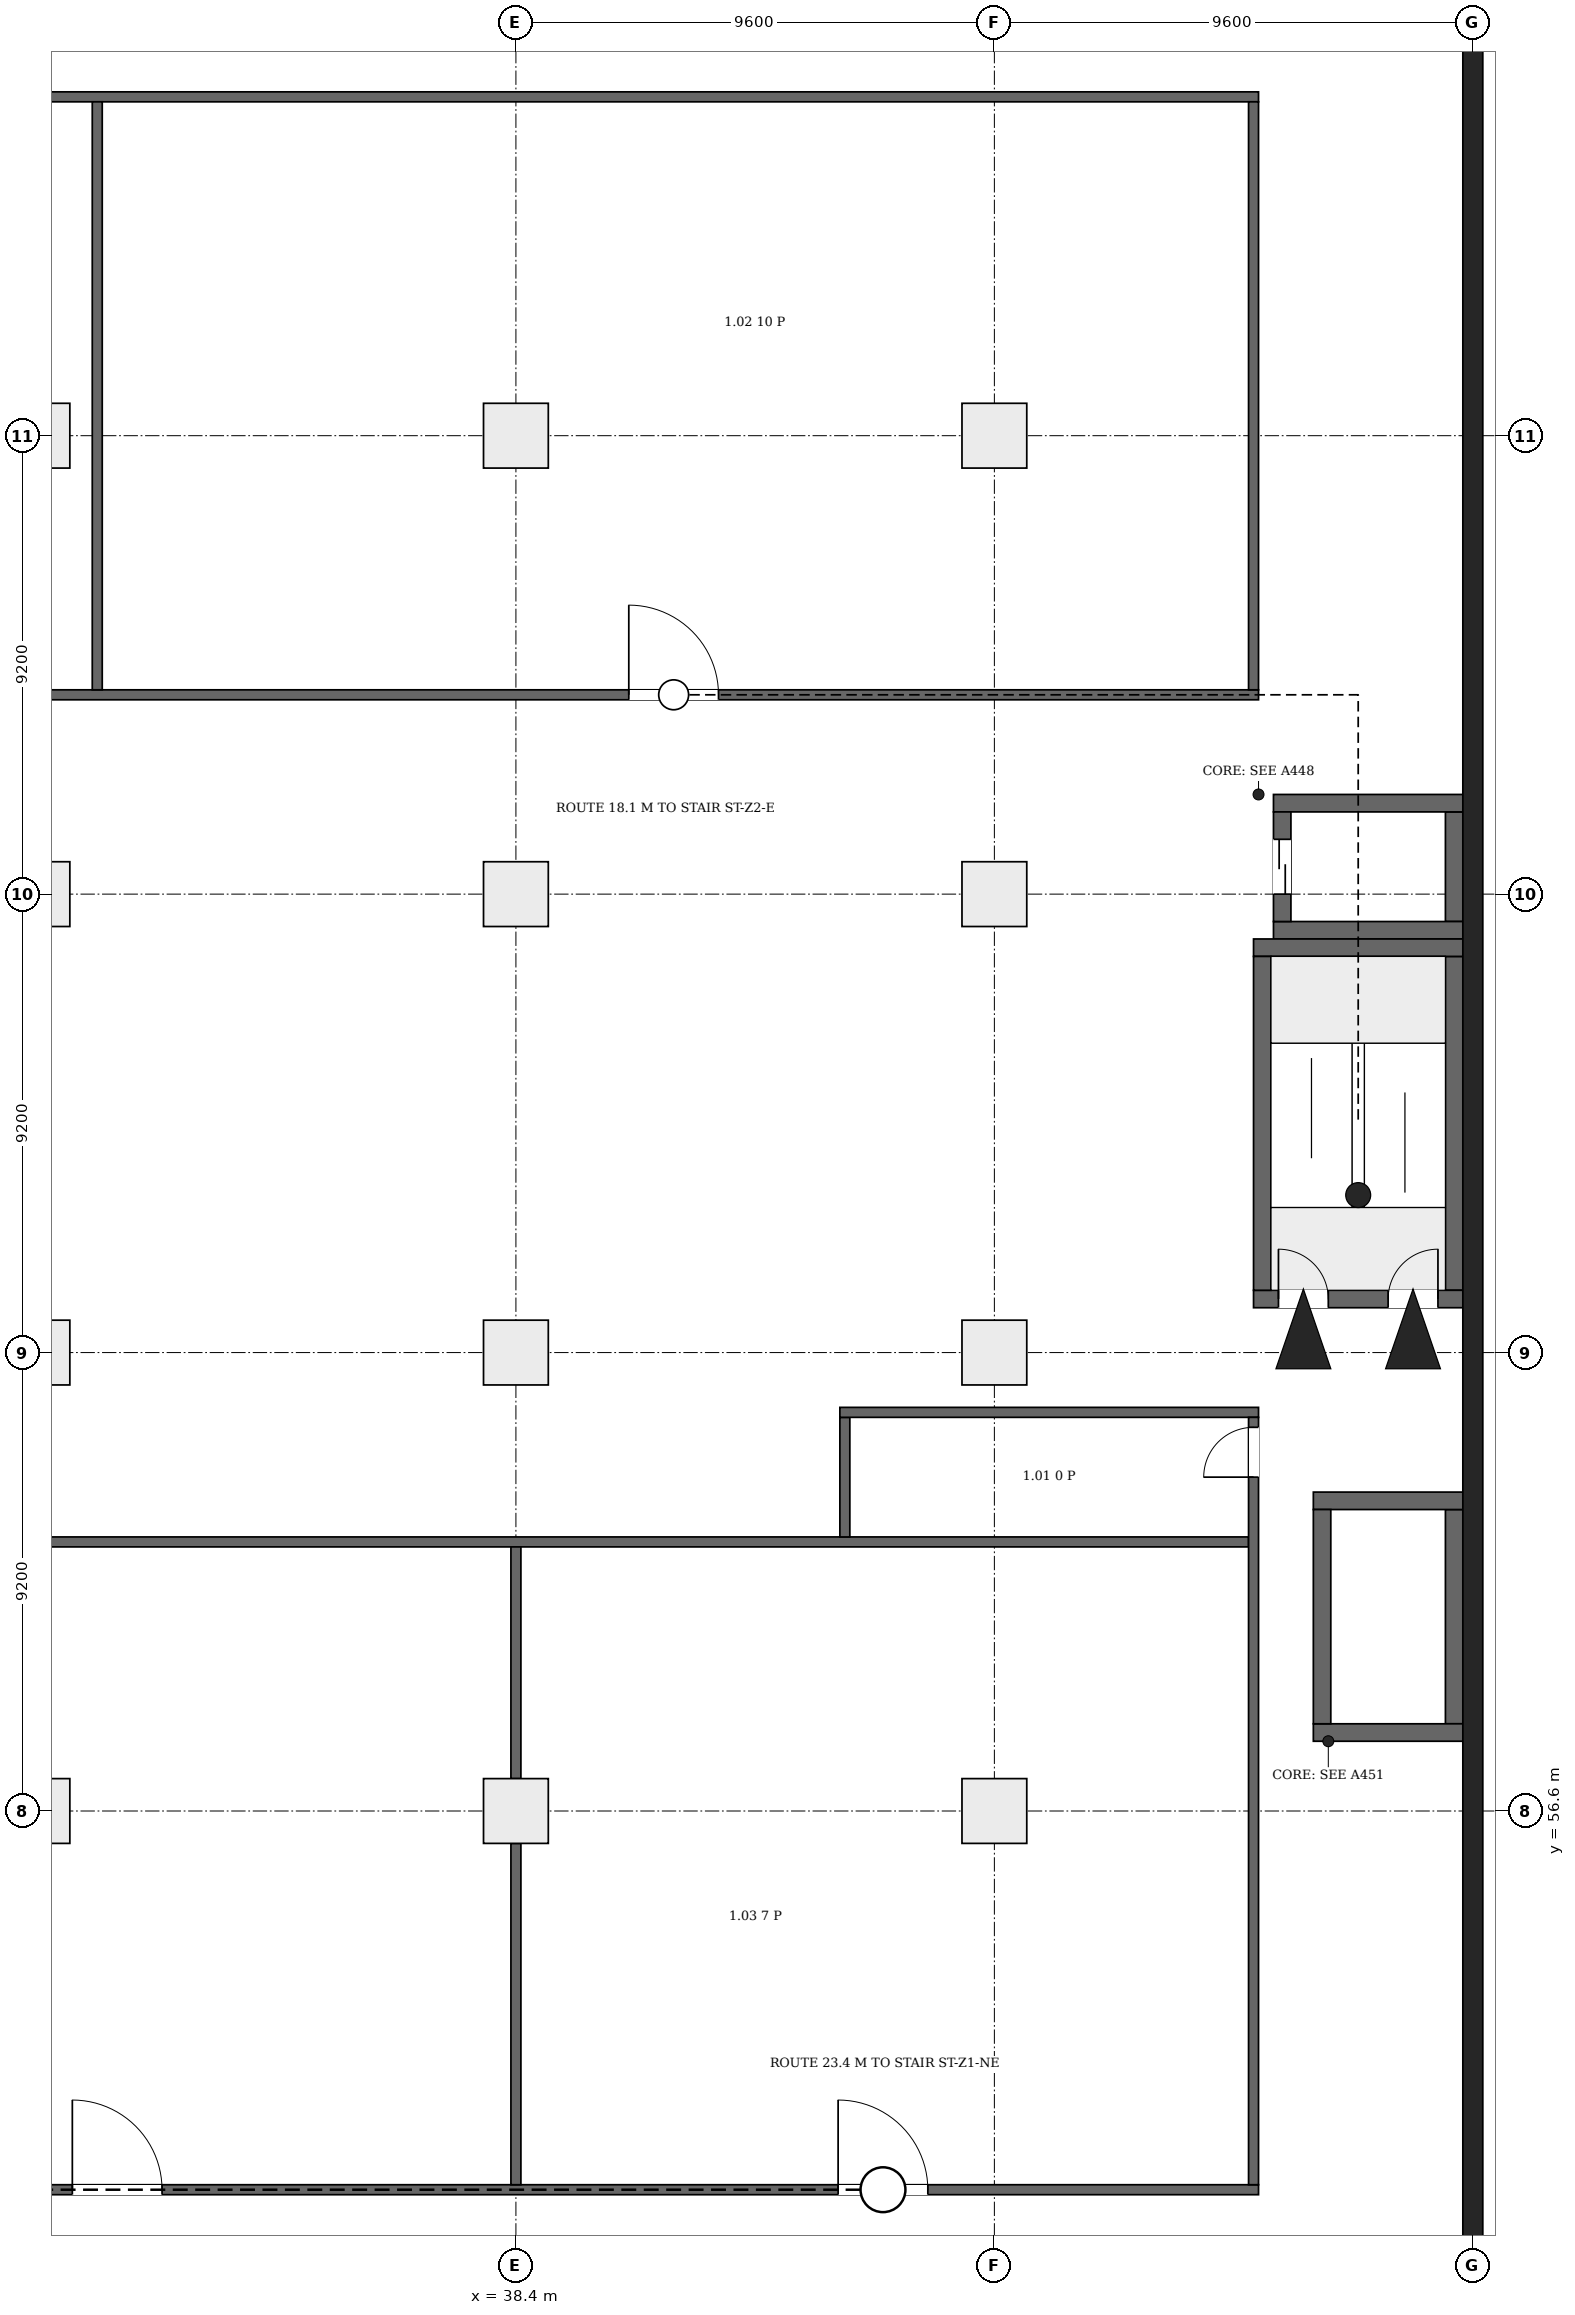
"""IFC4 building model, lengths in metres.
Left out: names, types, materials, properties, quantities, classifications, styles, units other than length and angle.
Written with IfcOpenShell. Run it as: python <this file> out.ifc"""

import sys

from ifc_helpers import new_model, si_unit, direction, frame, frame_2d, origin, origin_2d, place, context, subcontext, project, spatial, rectangle, extrude, element, fill, save


model = new_model("IFC4")
c1 = context("Model", 3, precision=1e-05, world=origin(), true_north=direction((0.0, 1.0)))
c2 = subcontext(c1, "Body", "Model", "MODEL_VIEW")
j1 = project(units=[si_unit("LENGTHUNIT", "METRE"), si_unit("PLANEANGLEUNIT", "RADIAN")], contexts=[c1])
p1 = place(None, origin())
s1 = spatial("IfcSite", under=j1, at=p1, CompositionType="ELEMENT")
p2 = place(p1, origin())
s2 = spatial("IfcBuilding", under=s1, at=p2, CompositionType="ELEMENT")
p3 = place(p2, frame((0.0, 0.0, 6.5)))
s3 = spatial("IfcBuildingStorey", under=s2, at=p3, CompositionType="ELEMENT", Elevation=6.5)
p4 = place(p3, frame((57.6, 46.72, 0.0), z_axis=(0.0, 0.0, 1.0), x_axis=(0.0, 1.0, 0.0)))
e1 = element("IfcWall", 1, at=p4, inside=s3, PredefinedType="SHEAR", context=c2, shape_type="SweptSolid", body=[
    extrude(rectangle(XDim=47.36, YDim=0.4, at=frame_2d((23.68, 0.0))), origin(), (0.0, 0.0, 1.0), 7.7),
])
p5 = place(p3, frame((53.2, 66.875, 0.0), z_axis=(0.0, 0.0, 1.0), x_axis=(1.0, 0.0, 0.0)))
e2 = element("IfcWall", 2, at=p5, inside=s3, PredefinedType="SHEAR", context=c2, shape_type="SweptSolid", body=[
    extrude(rectangle(XDim=4.2, YDim=0.35, at=frame_2d((2.1, 0.0))), origin(), (0.0, 0.0, 1.0), 7.7),
])
p6 = place(p5, frame((0.5, 0.0, 0.0)))
e3 = element("IfcOpeningElement", 3, at=p6, cuts=e2, PredefinedType="OPENING", context=c2, shape_type="SweptSolid", body=[
    extrude(rectangle(XDim=1.0, YDim=2.1, at=frame_2d((0.5, 1.05))), frame((0.0, 0.185, 0.0), z_axis=(0.0, -1.0, 0.0), x_axis=(1.0, 0.0, 0.0)), (0.0, 0.0, 1.0), 0.37),
])
p7 = place(p5, frame((2.7, 0.0, 0.0)))
e4 = element("IfcOpeningElement", 4, at=p7, cuts=e2, PredefinedType="OPENING", context=c2, shape_type="SweptSolid", body=[
    extrude(rectangle(XDim=1.0, YDim=2.1, at=frame_2d((0.5, 1.05))), frame((0.0, 0.185, 0.0), z_axis=(0.0, -1.0, 0.0), x_axis=(1.0, 0.0, 0.0)), (0.0, 0.0, 1.0), 0.37),
])
p8 = place(p3, frame((53.2, 73.925, 0.0), z_axis=(0.0, 0.0, 1.0), x_axis=(1.0, 0.0, 0.0)))
e5 = element("IfcWall", 5, at=p8, inside=s3, PredefinedType="SHEAR", context=c2, shape_type="SweptSolid", body=[
    extrude(rectangle(XDim=4.2, YDim=0.35, at=frame_2d((2.1, 0.0))), origin(), (0.0, 0.0, 1.0), 7.7),
])
for number, where, z_axis, x_axis in (
    (6, (53.375, 67.05, 0.0), (0.0, 0.0, 1.0), (0.0, 1.0, 0.0)),
    (7, (57.225, 67.05, 0.0), (0.0, 0.0, 1.0), (0.0, 1.0, 0.0)),
):
    element("IfcWall", number, at=place(p3, frame(where, z_axis=z_axis, x_axis=x_axis)), inside=s3, PredefinedType="SHEAR", context=c2, shape_type="SweptSolid", body=[
        extrude(rectangle(XDim=6.7, YDim=0.35, at=frame_2d((3.35, 0.0))), origin(), (0.0, 0.0, 1.0), 7.7),
    ])
for number, where, z_axis, x_axis in (
    (8, (53.6, 74.275, 0.0), (0.0, 0.0, 1.0), (1.0, 0.0, 0.0)),
    (9, (53.6, 76.825, 0.0), (0.0, 0.0, 1.0), (1.0, 0.0, 0.0)),
):
    element("IfcWall", number, at=place(p3, frame(where, z_axis=z_axis, x_axis=x_axis)), inside=s3, PredefinedType="SHEAR", context=c2, shape_type="SweptSolid", body=[
        extrude(rectangle(XDim=3.8, YDim=0.35, at=frame_2d((1.9, 0.0))), origin(), (0.0, 0.0, 1.0), 7.7),
    ])
p9 = place(p3, frame((53.775, 74.45, 0.0), z_axis=(0.0, 0.0, 1.0), x_axis=(0.0, 1.0, 0.0)))
e10 = element("IfcWall", 10, at=p9, inside=s3, PredefinedType="SHEAR", context=c2, shape_type="SweptSolid", body=[
    extrude(rectangle(XDim=2.2, YDim=0.35, at=frame_2d((1.1, 0.0))), origin(), (0.0, 0.0, 1.0), 7.7),
])
p10 = place(p9, frame((0.55, 0.0, 0.0)))
e11 = element("IfcOpeningElement", 11, at=p10, cuts=e10, PredefinedType="OPENING", context=c2, shape_type="SweptSolid", body=[
    extrude(rectangle(XDim=1.1, YDim=2.1, at=frame_2d((0.55, 1.05))), frame((0.0, 0.185, 0.0), z_axis=(0.0, -1.0, 0.0), x_axis=(1.0, 0.0, 0.0)), (0.0, 0.0, 1.0), 0.37),
])
p11 = place(p3, frame((57.225, 74.45, 0.0), z_axis=(0.0, 0.0, 1.0), x_axis=(0.0, 1.0, 0.0)))
e12 = element("IfcWall", 12, at=p11, inside=s3, PredefinedType="SHEAR", context=c2, shape_type="SweptSolid", body=[
    extrude(rectangle(XDim=2.2, YDim=0.35, at=frame_2d((1.1, 0.0))), origin(), (0.0, 0.0, 1.0), 7.7),
])
for number, where, z_axis, x_axis in (
    (13, (54.4, 58.175, 0.0), (0.0, 0.0, 1.0), (1.0, 0.0, 0.0)),
    (14, (54.4, 62.825, 0.0), (0.0, 0.0, 1.0), (1.0, 0.0, 0.0)),
):
    element("IfcWall", number, at=place(p3, frame(where, z_axis=z_axis, x_axis=x_axis)), inside=s3, PredefinedType="SHEAR", context=c2, shape_type="SweptSolid", body=[
        extrude(rectangle(XDim=3.0, YDim=0.35, at=frame_2d((1.5, 0.0))), origin(), (0.0, 0.0, 1.0), 7.7),
    ])
for number, where, z_axis, x_axis in (
    (15, (54.575, 58.35, 0.0), (0.0, 0.0, 1.0), (0.0, 1.0, 0.0)),
    (16, (57.225, 58.35, 0.0), (0.0, 0.0, 1.0), (0.0, 1.0, 0.0)),
):
    element("IfcWall", number, at=place(p3, frame(where, z_axis=z_axis, x_axis=x_axis)), inside=s3, PredefinedType="SHEAR", context=c2, shape_type="SweptSolid", body=[
        extrude(rectangle(XDim=4.3, YDim=0.35, at=frame_2d((2.15, 0.0))), origin(), (0.0, 0.0, 1.0), 7.7),
    ])
for number, where, z_axis, x_axis in (
    (17, (28.8, 56.6, 0.0), (0.0, 0.0, 1.0), (1.0, 0.0, 0.0)),
    (18, (38.4, 56.6, 0.0), (0.0, 0.0, 1.0), (1.0, 0.0, 0.0)),
    (19, (48.0, 56.6, 0.0), (0.0, 0.0, 1.0), (1.0, 0.0, 0.0)),
    (20, (28.8, 65.8, 0.0), (0.0, 0.0, 1.0), (1.0, 0.0, 0.0)),
    (21, (38.4, 65.8, 0.0), (0.0, 0.0, 1.0), (1.0, 0.0, 0.0)),
    (22, (48.0, 65.8, 0.0), (0.0, 0.0, 1.0), (1.0, 0.0, 0.0)),
    (23, (28.8, 75.0, 0.0), (0.0, 0.0, 1.0), (1.0, 0.0, 0.0)),
    (24, (38.4, 75.0, 0.0), (0.0, 0.0, 1.0), (1.0, 0.0, 0.0)),
    (25, (48.0, 75.0, 0.0), (0.0, 0.0, 1.0), (1.0, 0.0, 0.0)),
    (26, (28.8, 84.2, 0.0), (0.0, 0.0, 1.0), (1.0, 0.0, 0.0)),
    (27, (38.4, 84.2, 0.0), (0.0, 0.0, 1.0), (1.0, 0.0, 0.0)),
    (28, (48.0, 84.2, 0.0), (0.0, 0.0, 1.0), (1.0, 0.0, 0.0)),
):
    element("IfcColumn", number, at=place(p3, frame(where, z_axis=z_axis, x_axis=x_axis)), inside=s3, PredefinedType="COLUMN", context=c2, shape_type="SweptSolid", body=[
        extrude(rectangle(XDim=1.3, YDim=1.3, at=origin_2d()), origin(), (0.0, 0.0, 1.0), 7.7),
    ])
p12 = place(p3, frame((4.3, 49.0, 0.0), z_axis=(0.0, 0.0, 1.0), x_axis=(1.0, 0.0, 0.0)))
e29 = element("IfcWall", 29, at=p12, inside=s3, PredefinedType="PARTITIONING", context=c2, shape_type="SweptSolid", body=[
    extrude(rectangle(XDim=49.0, YDim=0.2, at=frame_2d((24.5, 0.0))), origin(), (0.0, 0.0, 1.0), 5.1),
])
p13 = place(p12, frame((6.635, 0.0, 0.0)))
e30 = element("IfcOpeningElement", 30, at=p13, cuts=e29, PredefinedType="OPENING", context=c2, shape_type="SweptSolid", body=[
    extrude(rectangle(XDim=1.8, YDim=2.1, at=frame_2d((0.9, 1.05))), frame((0.0, 0.11, 0.0), z_axis=(0.0, -1.0, 0.0), x_axis=(1.0, 0.0, 0.0)), (0.0, 0.0, 1.0), 0.22),
])
p14 = place(p12, frame((25.2, 0.0, 0.0)))
e31 = element("IfcOpeningElement", 31, at=p14, cuts=e29, PredefinedType="OPENING", context=c2, shape_type="SweptSolid", body=[
    extrude(rectangle(XDim=1.8, YDim=2.1, at=frame_2d((0.9, 1.05))), frame((0.0, 0.11, 0.0), z_axis=(0.0, -1.0, 0.0), x_axis=(1.0, 0.0, 0.0)), (0.0, 0.0, 1.0), 0.22),
])
p15 = place(p12, frame((40.565, 0.0, 0.0)))
e32 = element("IfcOpeningElement", 32, at=p15, cuts=e29, PredefinedType="OPENING", context=c2, shape_type="SweptSolid", body=[
    extrude(rectangle(XDim=1.8, YDim=2.1, at=frame_2d((0.9, 1.05))), frame((0.0, 0.11, 0.0), z_axis=(0.0, -1.0, 0.0), x_axis=(1.0, 0.0, 0.0)), (0.0, 0.0, 1.0), 0.22),
])
p16 = place(p3, frame((4.3, 79.0, 0.0), z_axis=(0.0, 0.0, 1.0), x_axis=(1.0, 0.0, 0.0)))
e33 = element("IfcWall", 33, at=p16, inside=s3, PredefinedType="PARTITIONING", context=c2, shape_type="SweptSolid", body=[
    extrude(rectangle(XDim=49.0, YDim=0.2, at=frame_2d((24.5, 0.0))), origin(), (0.0, 0.0, 1.0), 5.1),
])
p17 = place(p16, frame((12.035, 0.0, 0.0)))
e34 = element("IfcOpeningElement", 34, at=p17, cuts=e33, PredefinedType="OPENING", context=c2, shape_type="SweptSolid", body=[
    extrude(rectangle(XDim=1.8, YDim=2.1, at=frame_2d((0.9, 1.05))), frame((0.0, 0.11, 0.0), z_axis=(0.0, -1.0, 0.0), x_axis=(1.0, 0.0, 0.0)), (0.0, 0.0, 1.0), 0.22),
])
p18 = place(p16, frame((36.365, 0.0, 0.0)))
e35 = element("IfcOpeningElement", 35, at=p18, cuts=e33, PredefinedType="OPENING", context=c2, shape_type="SweptSolid", body=[
    extrude(rectangle(XDim=1.8, YDim=2.1, at=frame_2d((0.9, 1.05))), frame((0.0, 0.11, 0.0), z_axis=(0.0, -1.0, 0.0), x_axis=(1.0, 0.0, 0.0)), (0.0, 0.0, 1.0), 0.22),
])
p19 = place(p3, frame((4.3, 91.0, 0.0), z_axis=(0.0, 0.0, 1.0), x_axis=(1.0, 0.0, 0.0)))
e36 = element("IfcWall", 36, at=p19, inside=s3, PredefinedType="PARTITIONING", context=c2, shape_type="SweptSolid", body=[
    extrude(rectangle(XDim=49.0, YDim=0.2, at=frame_2d((24.5, 0.0))), origin(), (0.0, 0.0, 1.0), 5.1),
])
p20 = place(p3, frame((4.5, 62.0, 0.0), z_axis=(0.0, 0.0, 1.0), x_axis=(1.0, 0.0, 0.0)))
e37 = element("IfcWall", 37, at=p20, inside=s3, PredefinedType="PARTITIONING", context=c2, shape_type="SweptSolid", body=[
    extrude(rectangle(XDim=48.6, YDim=0.2, at=frame_2d((24.3, 0.0))), origin(), (0.0, 0.0, 1.0), 5.1),
])
p21 = place(p3, frame((30.0, 79.1, 0.0), z_axis=(0.0, 0.0, 1.0), x_axis=(0.0, 1.0, 0.0)))
e38 = element("IfcWall", 38, at=p21, inside=s3, PredefinedType="PARTITIONING", context=c2, shape_type="SweptSolid", body=[
    extrude(rectangle(XDim=11.8, YDim=0.2, at=frame_2d((5.9, 0.0))), origin(), (0.0, 0.0, 1.0), 5.1),
])
p22 = place(p3, frame((38.4, 49.1, 0.0), z_axis=(0.0, 0.0, 1.0), x_axis=(0.0, 1.0, 0.0)))
e39 = element("IfcWall", 39, at=p22, inside=s3, PredefinedType="PARTITIONING", context=c2, shape_type="SweptSolid", body=[
    extrude(rectangle(XDim=6.85, YDim=0.2, at=frame_2d((3.425, 0.0))), origin(), (0.0, 0.0, 1.0), 4.7),
])
p23 = place(p3, frame((38.4, 57.25, 0.0), z_axis=(0.0, 0.0, 1.0), x_axis=(0.0, 1.0, 0.0)))
e40 = element("IfcWall", 40, at=p23, inside=s3, PredefinedType="PARTITIONING", context=c2, shape_type="SweptSolid", body=[
    extrude(rectangle(XDim=4.65, YDim=0.2, at=frame_2d((2.325, 0.0))), origin(), (0.0, 0.0, 1.0), 4.7),
])
p24 = place(p3, frame((45.0, 62.1, 0.0), z_axis=(0.0, 0.0, 1.0), x_axis=(0.0, 1.0, 0.0)))
e41 = element("IfcWall", 41, at=p24, inside=s3, PredefinedType="PARTITIONING", context=c2, shape_type="SweptSolid", body=[
    extrude(rectangle(XDim=2.4, YDim=0.2, at=frame_2d((1.2, 0.0))), origin(), (0.0, 0.0, 1.0), 5.1),
])
p25 = place(p3, frame((44.9, 64.6, 0.0), z_axis=(0.0, 0.0, 1.0), x_axis=(1.0, 0.0, 0.0)))
e42 = element("IfcWall", 42, at=p25, inside=s3, PredefinedType="PARTITIONING", context=c2, shape_type="SweptSolid", body=[
    extrude(rectangle(XDim=8.4, YDim=0.2, at=frame_2d((4.2, 0.0))), origin(), (0.0, 0.0, 1.0), 5.1),
])
p26 = place(p3, frame((53.2, 49.1, 0.0), z_axis=(0.0, 0.0, 1.0), x_axis=(0.0, 1.0, 0.0)))
e43 = element("IfcWall", 43, at=p26, inside=s3, PredefinedType="PARTITIONING", context=c2, shape_type="SweptSolid", body=[
    extrude(rectangle(XDim=15.4, YDim=0.2, at=frame_2d((7.7, 0.0))), origin(), (0.0, 0.0, 1.0), 7.35),
])
p27 = place(p26, frame((14.2, 0.0, 0.0)))
e44 = element("IfcOpeningElement", 44, at=p27, cuts=e43, PredefinedType="OPENING", context=c2, shape_type="SweptSolid", body=[
    extrude(rectangle(XDim=1.0, YDim=2.1, at=frame_2d((0.5, 1.05))), frame((0.0, 0.11, 0.0), z_axis=(0.0, -1.0, 0.0), x_axis=(1.0, 0.0, 0.0)), (0.0, 0.0, 1.0), 0.22),
])
p28 = place(p3, frame((53.2, 79.1, 0.0), z_axis=(0.0, 0.0, 1.0), x_axis=(0.0, 1.0, 0.0)))
e45 = element("IfcWall", 45, at=p28, inside=s3, PredefinedType="PARTITIONING", context=c2, shape_type="SweptSolid", body=[
    extrude(rectangle(XDim=11.8, YDim=0.2, at=frame_2d((5.9, 0.0))), origin(), (0.0, 0.0, 1.0), 7.35),
])
p29 = place(p6, origin())
e46 = element("IfcDoor", 46, at=p29, inside=s3, OperationType="SINGLE_SWING_RIGHT", PredefinedType="DOOR", context=c2, shape_type="SweptSolid", body=[
    extrude(rectangle(XDim=1.0, YDim=2.1, at=frame_2d((0.5, 1.05))), frame((0.0, 0.025, 0.0), z_axis=(0.0, -1.0, 0.0), x_axis=(1.0, 0.0, 0.0)), (0.0, 0.0, 1.0), 0.05),
])
fill(e3, e46)
p30 = place(p7, origin())
e47 = element("IfcDoor", 47, at=p30, inside=s3, OperationType="SINGLE_SWING_LEFT", PredefinedType="DOOR", context=c2, shape_type="SweptSolid", body=[
    extrude(rectangle(XDim=1.0, YDim=2.1, at=frame_2d((0.5, 1.05))), frame((0.0, 0.025, 0.0), z_axis=(0.0, -1.0, 0.0), x_axis=(1.0, 0.0, 0.0)), (0.0, 0.0, 1.0), 0.05),
])
fill(e4, e47)
p31 = place(p10, origin())
e48 = element("IfcDoor", 48, at=p31, inside=s3, OperationType="DOUBLE_DOOR_SLIDING", PredefinedType="DOOR", context=c2, shape_type="SweptSolid", body=[
    extrude(rectangle(XDim=1.1, YDim=2.1, at=frame_2d((0.55, 1.05))), frame((0.0, 0.025, 0.0), z_axis=(0.0, -1.0, 0.0), x_axis=(1.0, 0.0, 0.0)), (0.0, 0.0, 1.0), 0.05),
])
fill(e11, e48)
p32 = place(p14, origin())
e49 = element("IfcDoor", 49, at=p32, inside=s3, OperationType="DOUBLE_DOOR_SINGLE_SWING", PredefinedType="DOOR", context=c2, shape_type="SweptSolid", body=[
    extrude(rectangle(XDim=1.8, YDim=2.1, at=frame_2d((0.9, 1.05))), frame((0.0, 0.025, 0.0), z_axis=(0.0, -1.0, 0.0), x_axis=(1.0, 0.0, 0.0)), (0.0, 0.0, 1.0), 0.05),
])
fill(e31, e49)
p33 = place(p15, origin())
e50 = element("IfcDoor", 50, at=p33, inside=s3, OperationType="DOUBLE_DOOR_SINGLE_SWING", PredefinedType="DOOR", context=c2, shape_type="SweptSolid", body=[
    extrude(rectangle(XDim=1.8, YDim=2.1, at=frame_2d((0.9, 1.05))), frame((0.0, 0.025, 0.0), z_axis=(0.0, -1.0, 0.0), x_axis=(1.0, 0.0, 0.0)), (0.0, 0.0, 1.0), 0.05),
])
fill(e32, e50)
p34 = place(p18, origin())
e51 = element("IfcDoor", 51, at=p34, inside=s3, OperationType="DOUBLE_DOOR_SINGLE_SWING", PredefinedType="DOOR", context=c2, shape_type="SweptSolid", body=[
    extrude(rectangle(XDim=1.8, YDim=2.1, at=frame_2d((0.9, 1.05))), frame((0.0, 0.025, 0.0), z_axis=(0.0, -1.0, 0.0), x_axis=(1.0, 0.0, 0.0)), (0.0, 0.0, 1.0), 0.05),
])
fill(e35, e51)
p35 = place(p27, origin())
e52 = element("IfcDoor", 52, at=p35, inside=s3, OperationType="SINGLE_SWING_RIGHT", PredefinedType="DOOR", context=c2, shape_type="SweptSolid", body=[
    extrude(rectangle(XDim=1.0, YDim=2.1, at=frame_2d((0.5, 1.05))), frame((0.0, 0.025, 0.0), z_axis=(0.0, -1.0, 0.0), x_axis=(1.0, 0.0, 0.0)), (0.0, 0.0, 1.0), 0.05),
])
fill(e44, e52)
save(model, sys.argv[1])
